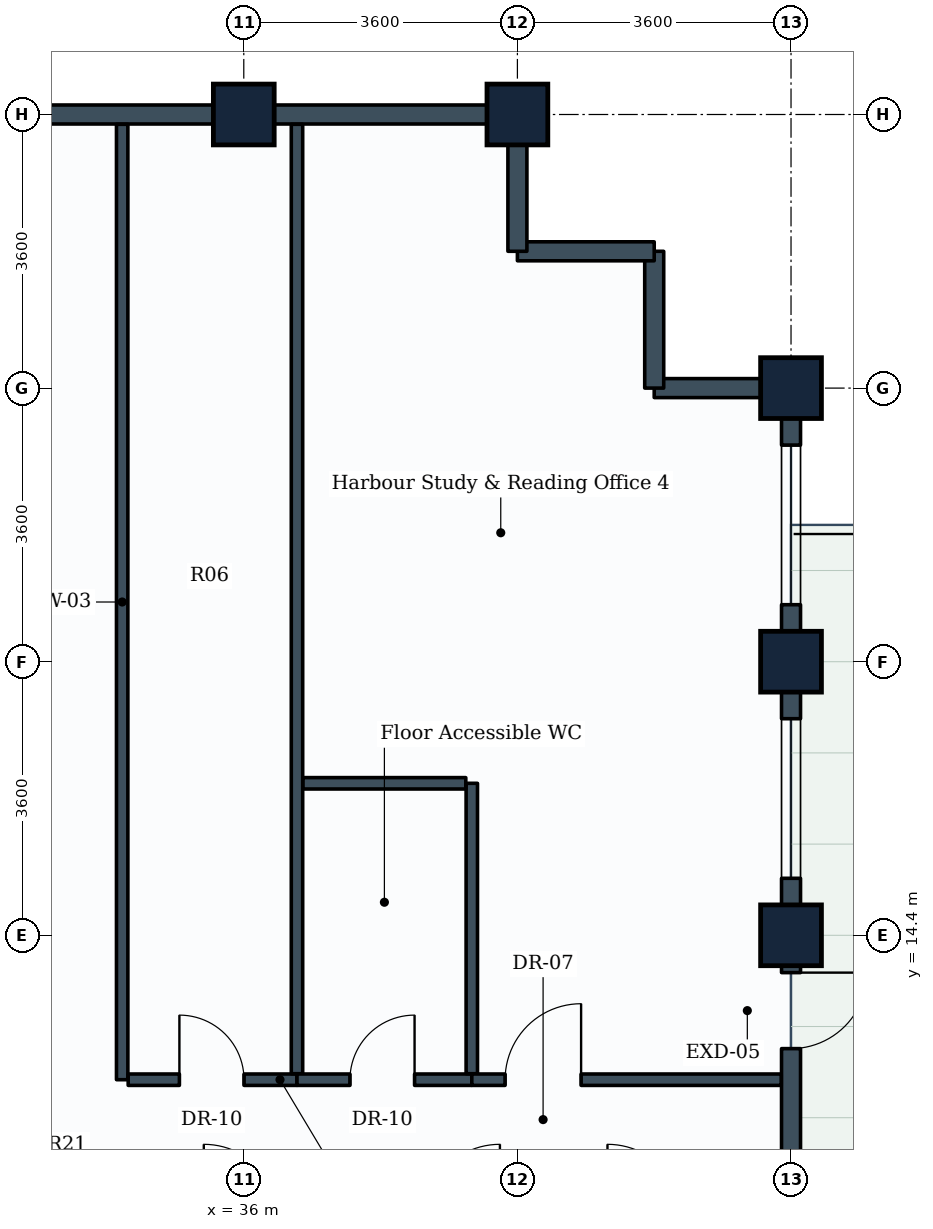
"""IFC4 building model, lengths in metres.
Left out: names, types, materials, properties, quantities, classifications, styles, units other than length and angle.
Written with IfcOpenShell. Run it as: python <this file> out.ifc"""

import sys

from ifc_helpers import new_model, si_unit, direction, frame, frame_2d, origin, origin_2d, place, context, subcontext, project, spatial, rectangle, extrude, element, fill, save


model = new_model("IFC4")
c1 = context("Model", 3, precision=1e-05, world=origin(), true_north=direction((0.0, 1.0)))
c2 = subcontext(c1, "Body", "Model", "MODEL_VIEW")
j1 = project(units=[si_unit("LENGTHUNIT", "METRE"), si_unit("PLANEANGLEUNIT", "RADIAN")], contexts=[c1])
p1 = place(None, origin())
s1 = spatial("IfcSite", under=j1, at=p1, CompositionType="ELEMENT")
p2 = place(p1, origin())
s2 = spatial("IfcBuilding", under=s1, at=p2, CompositionType="ELEMENT")
p3 = place(p2, frame((0.0, 0.0, 224.6)))
s3 = spatial("IfcBuildingStorey", under=s2, at=p3, CompositionType="ELEMENT", Elevation=224.6)
for number, where, z_axis, x_axis in (
    (1, (36.0, 25.2, 0.0), (0.0, 0.0, 1.0), (1.0, 0.0, 0.0)),
    (2, (39.6, 25.2, 0.0), (0.0, 0.0, 1.0), (1.0, 0.0, 0.0)),
    (3, (43.2, 14.4, 0.0), (0.0, 0.0, 1.0), (0.0, 1.0, 0.0)),
    (4, (43.2, 18.0, 0.0), (0.0, 0.0, 1.0), (0.0, 1.0, 0.0)),
    (5, (43.2, 21.6, 0.0), (0.0, 0.0, 1.0), (0.0, 1.0, 0.0)),
):
    element("IfcColumn", number, at=place(p3, frame(where, z_axis=z_axis, x_axis=x_axis)), inside=s3, PredefinedType="COLUMN", context=c2, shape_type="SweptSolid", body=[
        extrude(rectangle(XDim=0.8, YDim=0.8, at=origin_2d()), origin(), (0.0, 0.0, 1.0), 3.6),
    ])
p4 = place(p3, frame((43.2, 14.4, 0.0), z_axis=(0.0, 0.0, 1.0), x_axis=(0.0, -1.0, 0.0)))
e6 = element("IfcWall", 6, at=p4, inside=s3, PredefinedType="STANDARD", context=c2, shape_type="SweptSolid", body=[
    extrude(rectangle(XDim=3.6, YDim=0.25, at=frame_2d((1.8, 0.0))), origin(), (0.0, 0.0, 1.0), 2.83),
])
p5 = place(p4, frame((0.491, 0.0, 0.0)))
e7 = element("IfcOpeningElement", 7, at=p5, cuts=e6, PredefinedType="OPENING", context=c2, shape_type="SweptSolid", body=[
    extrude(rectangle(XDim=1.0, YDim=2.1, at=frame_2d((0.5, 1.05))), frame((0.0, 0.135, 0.0), z_axis=(0.0, -1.0, 0.0), x_axis=(1.0, 0.0, 0.0)), (0.0, 0.0, 1.0), 0.27),
])
p6 = place(p3, frame((43.2, 18.0, 0.0), z_axis=(0.0, 0.0, 1.0), x_axis=(0.0, -1.0, 0.0)))
e8 = element("IfcWall", 8, at=p6, inside=s3, PredefinedType="STANDARD", context=c2, shape_type="SweptSolid", body=[
    extrude(rectangle(XDim=3.6, YDim=0.25, at=frame_2d((1.8, 0.0))), origin(), (0.0, 0.0, 1.0), 2.83),
])
p7 = place(p6, frame((0.75, 0.0, 0.85)))
e9 = element("IfcOpeningElement", 9, at=p7, cuts=e8, PredefinedType="OPENING", context=c2, shape_type="SweptSolid", body=[
    extrude(rectangle(XDim=2.1, YDim=1.35, at=frame_2d((1.05, 0.675))), frame((0.0, 0.135, 0.0), z_axis=(0.0, -1.0, 0.0), x_axis=(1.0, 0.0, 0.0)), (0.0, 0.0, 1.0), 0.27),
])
p8 = place(p3, frame((43.2, 21.6, 0.0), z_axis=(0.0, 0.0, 1.0), x_axis=(0.0, -1.0, 0.0)))
e10 = element("IfcWall", 10, at=p8, inside=s3, PredefinedType="STANDARD", context=c2, shape_type="SweptSolid", body=[
    extrude(rectangle(XDim=3.6, YDim=0.25, at=frame_2d((1.8, 0.0))), origin(), (0.0, 0.0, 1.0), 2.83),
])
p9 = place(p8, frame((0.75, 0.0, 0.85)))
e11 = element("IfcOpeningElement", 11, at=p9, cuts=e10, PredefinedType="OPENING", context=c2, shape_type="SweptSolid", body=[
    extrude(rectangle(XDim=2.1, YDim=1.35, at=frame_2d((1.05, 0.675))), frame((0.0, 0.135, 0.0), z_axis=(0.0, -1.0, 0.0), x_axis=(1.0, 0.0, 0.0)), (0.0, 0.0, 1.0), 0.27),
])
p10 = place(p3, frame((41.4, 21.6, 0.0), z_axis=(0.0, 0.0, 1.0), x_axis=(1.0, 0.0, 0.0)))
e12 = element("IfcWall", 12, at=p10, inside=s3, PredefinedType="STANDARD", context=c2, shape_type="SweptSolid", body=[
    extrude(rectangle(XDim=1.8, YDim=0.25, at=frame_2d((0.9, 0.0))), origin(), (0.0, 0.0, 1.0), 2.83),
])
for number, where, z_axis, x_axis in (
    (13, (41.4, 23.4, 0.0), (0.0, 0.0, 1.0), (0.0, -1.0, 0.0)),
    (14, (39.6, 23.4, 0.0), (0.0, 0.0, 1.0), (1.0, 0.0, 0.0)),
):
    element("IfcWall", number, at=place(p3, frame(where, z_axis=z_axis, x_axis=x_axis)), inside=s3, PredefinedType="STANDARD", context=c2, shape_type="SweptSolid", body=[
        extrude(rectangle(XDim=1.8, YDim=0.25, at=frame_2d((0.9, 0.0))), origin(), (0.0, 0.0, 1.0), 3.335),
    ])
p11 = place(p3, frame((39.6, 25.2, 0.0), z_axis=(0.0, 0.0, 1.0), x_axis=(0.0, -1.0, 0.0)))
e15 = element("IfcWall", 15, at=p11, inside=s3, PredefinedType="STANDARD", context=c2, shape_type="SweptSolid", body=[
    extrude(rectangle(XDim=1.8, YDim=0.25, at=frame_2d((0.9, 0.0))), origin(), (0.0, 0.0, 1.0), 2.83),
])
for number, where, z_axis, x_axis in (
    (16, (36.0, 25.2, 0.0), (0.0, 0.0, 1.0), (1.0, 0.0, 0.0)),
    (17, (32.4, 25.2, 0.0), (0.0, 0.0, 1.0), (1.0, 0.0, 0.0)),
):
    element("IfcWall", number, at=place(p3, frame(where, z_axis=z_axis, x_axis=x_axis)), inside=s3, PredefinedType="STANDARD", context=c2, shape_type="SweptSolid", body=[
        extrude(rectangle(XDim=3.6, YDim=0.25, at=frame_2d((1.8, 0.0))), origin(), (0.0, 0.0, 1.0), 2.83),
    ])
p12 = place(p3, frame((34.4, 12.5, 0.0), z_axis=(0.0, 0.0, 1.0), x_axis=(0.0, 1.0, 0.0)))
e18 = element("IfcWall", 18, at=p12, inside=s3, PredefinedType="PARTITIONING", context=c2, shape_type="SweptSolid", body=[
    extrude(rectangle(XDim=12.571, YDim=0.15, at=frame_2d((6.286, 0.0))), origin(), (0.0, 0.0, 1.0), 2.83),
])
p13 = place(p3, frame((34.479, 12.5, 0.0), z_axis=(0.0, 0.0, 1.0), x_axis=(1.0, 0.0, 0.0)))
e19 = element("IfcWall", 19, at=p13, inside=s3, PredefinedType="PARTITIONING", context=c2, shape_type="SweptSolid", body=[
    extrude(rectangle(XDim=2.221, YDim=0.15, at=frame_2d((1.11, 0.0))), origin(), (0.0, 0.0, 1.0), 3.02),
])
p14 = place(p13, frame((0.674, 0.0, 0.0)))
e20 = element("IfcOpeningElement", 20, at=p14, cuts=e19, PredefinedType="OPENING", context=c2, shape_type="SweptSolid", body=[
    extrude(rectangle(XDim=0.85, YDim=2.1, at=frame_2d((0.425, 1.05))), frame((0.0, 0.085, 0.0), z_axis=(0.0, -1.0, 0.0), x_axis=(1.0, 0.0, 0.0)), (0.0, 0.0, 1.0), 0.17),
])
p15 = place(p3, frame((36.7, 12.579, 0.0), z_axis=(0.0, 0.0, 1.0), x_axis=(0.0, 1.0, 0.0)))
e21 = element("IfcWall", 21, at=p15, inside=s3, PredefinedType="PARTITIONING", context=c2, shape_type="SweptSolid", body=[
    extrude(rectangle(XDim=12.492, YDim=0.15, at=frame_2d((6.246, 0.0))), origin(), (0.0, 0.0, 1.0), 2.83),
])
p16 = place(p3, frame((36.7, 12.5, 0.0), z_axis=(0.0, 0.0, 1.0), x_axis=(1.0, 0.0, 0.0)))
e22 = element("IfcWall", 22, at=p16, inside=s3, PredefinedType="PARTITIONING", context=c2, shape_type="SweptSolid", body=[
    extrude(rectangle(XDim=2.3, YDim=0.15, at=frame_2d((1.15, 0.0))), origin(), (0.0, 0.0, 1.0), 3.335),
])
p17 = place(p16, frame((0.697, 0.0, 0.0)))
e23 = element("IfcOpeningElement", 23, at=p17, cuts=e22, PredefinedType="OPENING", context=c2, shape_type="SweptSolid", body=[
    extrude(rectangle(XDim=0.85, YDim=2.1, at=frame_2d((0.425, 1.05))), frame((0.0, 0.085, 0.0), z_axis=(0.0, -1.0, 0.0), x_axis=(1.0, 0.0, 0.0)), (0.0, 0.0, 1.0), 0.17),
])
p18 = place(p3, frame((39.0, 12.579, 0.0), z_axis=(0.0, 0.0, 1.0), x_axis=(0.0, 1.0, 0.0)))
e24 = element("IfcWall", 24, at=p18, inside=s3, PredefinedType="PARTITIONING", context=c2, shape_type="SweptSolid", body=[
    extrude(rectangle(XDim=3.821, YDim=0.15, at=frame_2d((1.91, 0.0))), origin(), (0.0, 0.0, 1.0), 3.03),
])
p19 = place(p3, frame((36.779, 16.4, 0.0), z_axis=(0.0, 0.0, 1.0), x_axis=(1.0, 0.0, 0.0)))
e25 = element("IfcWall", 25, at=p19, inside=s3, PredefinedType="PARTITIONING", context=c2, shape_type="SweptSolid", body=[
    extrude(rectangle(XDim=2.142, YDim=0.15, at=frame_2d((1.071, 0.0))), origin(), (0.0, 0.0, 1.0), 3.335),
])
p20 = place(p3, frame((39.0, 12.5, 0.0), z_axis=(0.0, 0.0, 1.0), x_axis=(1.0, 0.0, 0.0)))
e26 = element("IfcWall", 26, at=p20, inside=s3, PredefinedType="PARTITIONING", context=c2, shape_type="SweptSolid", body=[
    extrude(rectangle(XDim=4.071, YDim=0.15, at=frame_2d((2.036, 0.0))), origin(), (0.0, 0.0, 1.0), 2.83),
])
p21 = place(p20, frame((0.438, 0.0, 0.0)))
e27 = element("IfcOpeningElement", 27, at=p21, cuts=e26, PredefinedType="OPENING", context=c2, shape_type="SweptSolid", body=[
    extrude(rectangle(XDim=1.0, YDim=2.1, at=frame_2d((0.5, 1.05))), frame((0.0, 0.085, 0.0), z_axis=(0.0, -1.0, 0.0), x_axis=(1.0, 0.0, 0.0)), (0.0, 0.0, 1.0), 0.17),
])
p22 = place(p5, origin())
e28 = element("IfcDoor", 28, at=p22, inside=s3, OperationType="SINGLE_SWING_LEFT", PredefinedType="DOOR", context=c2, shape_type="SweptSolid", body=[
    extrude(rectangle(XDim=1.0, YDim=2.1, at=frame_2d((0.5, 1.05))), frame((0.0, 0.025, 0.0), z_axis=(0.0, -1.0, 0.0), x_axis=(1.0, 0.0, 0.0)), (0.0, 0.0, 1.0), 0.05),
])
fill(e7, e28)
p23 = place(p7, origin())
e29 = element("IfcWindow", 29, at=p23, inside=s3, PartitioningType="SINGLE_PANEL", PredefinedType="WINDOW", context=c2, shape_type="SweptSolid", body=[
    extrude(rectangle(XDim=2.1, YDim=1.35, at=frame_2d((1.05, 0.675))), frame((0.0, 0.03, 0.0), z_axis=(0.0, -1.0, 0.0), x_axis=(1.0, 0.0, 0.0)), (0.0, 0.0, 1.0), 0.06),
])
fill(e9, e29)
p24 = place(p9, origin())
e30 = element("IfcWindow", 30, at=p24, inside=s3, PartitioningType="SINGLE_PANEL", PredefinedType="WINDOW", context=c2, shape_type="SweptSolid", body=[
    extrude(rectangle(XDim=2.1, YDim=1.35, at=frame_2d((1.05, 0.675))), frame((0.0, 0.03, 0.0), z_axis=(0.0, -1.0, 0.0), x_axis=(1.0, 0.0, 0.0)), (0.0, 0.0, 1.0), 0.06),
])
fill(e11, e30)
p25 = place(p14, origin())
e31 = element("IfcDoor", 31, at=p25, inside=s3, OperationType="SINGLE_SWING_LEFT", PredefinedType="DOOR", context=c2, shape_type="SweptSolid", body=[
    extrude(rectangle(XDim=0.85, YDim=2.1, at=frame_2d((0.425, 1.05))), frame((0.0, 0.025, 0.0), z_axis=(0.0, -1.0, 0.0), x_axis=(1.0, 0.0, 0.0)), (0.0, 0.0, 1.0), 0.05),
])
fill(e20, e31)
p26 = place(p17, origin())
e32 = element("IfcDoor", 32, at=p26, inside=s3, OperationType="SINGLE_SWING_RIGHT", PredefinedType="DOOR", context=c2, shape_type="SweptSolid", body=[
    extrude(rectangle(XDim=0.85, YDim=2.1, at=frame_2d((0.425, 1.05))), frame((0.0, 0.025, 0.0), z_axis=(0.0, -1.0, 0.0), x_axis=(1.0, 0.0, 0.0)), (0.0, 0.0, 1.0), 0.05),
])
fill(e23, e32)
p27 = place(p21, origin())
e33 = element("IfcDoor", 33, at=p27, inside=s3, OperationType="SINGLE_SWING_RIGHT", PredefinedType="DOOR", context=c2, shape_type="SweptSolid", body=[
    extrude(rectangle(XDim=1.0, YDim=2.1, at=frame_2d((0.5, 1.05))), frame((0.0, 0.025, 0.0), z_axis=(0.0, -1.0, 0.0), x_axis=(1.0, 0.0, 0.0)), (0.0, 0.0, 1.0), 0.05),
])
fill(e27, e33)
save(model, sys.argv[1])
